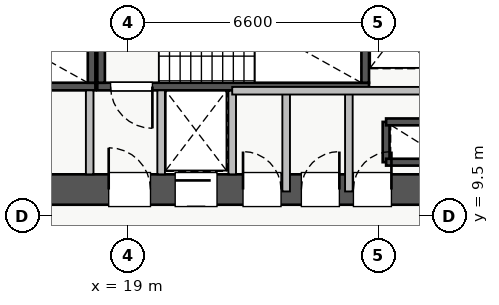
"""IFC4 building model, lengths in metres.
Left out: names, types, materials, properties, quantities, classifications, styles, units other than length and angle.
Written with IfcOpenShell. Run it as: python <this file> out.ifc"""

import sys

from ifc_helpers import new_model, si_unit, direction, frame, frame_2d, origin, place, context, subcontext, project, spatial, rectangle, extrude, source, transform, mapped, element, fill, save


model = new_model("IFC4")
c1 = context("Model", 3, precision=1e-05, world=origin(), true_north=direction((0.0, 1.0)))
c2 = subcontext(c1, "Body", "Model", "MODEL_VIEW")
j1 = project(units=[si_unit("LENGTHUNIT", "METRE"), si_unit("PLANEANGLEUNIT", "RADIAN")], contexts=[c1])
p1 = place(None, origin())
s1 = spatial("IfcSite", under=j1, at=p1, CompositionType="ELEMENT")
p2 = place(p1, origin())
s2 = spatial("IfcBuilding", under=s1, at=p2, CompositionType="ELEMENT")
p3 = place(p2, frame((0.0, 0.0, 53.5)))
s3 = spatial("IfcBuildingStorey", under=s2, at=p3, CompositionType="ELEMENT", Elevation=53.5)
p4 = place(p3, frame((25.8, 10.92, 0.0), z_axis=(0.0, 0.0, 1.0), x_axis=(0.0, 1.0, 0.0)))
e1 = element("IfcWall", 1, at=p4, inside=s3, PredefinedType="SHEAR", context=c2, shape_type="SweptSolid", body=[
    extrude(rectangle(XDim=1.06, YDim=0.18, at=frame_2d((0.53, 0.0))), origin(), (0.0, 0.0, 1.0), 3.07),
])
for number, where, z_axis, x_axis in (
    (2, (25.8, 11.98, 0.0), (0.0, 0.0, 1.0), (1.0, 0.0, 0.0)),
    (3, (25.8, 10.92, 0.0), (0.0, 0.0, 1.0), (1.0, 0.0, 0.0)),
):
    element("IfcWall", number, at=place(p3, frame(where, z_axis=z_axis, x_axis=x_axis)), inside=s3, PredefinedType="SHEAR", context=c2, shape_type="SweptSolid", body=[
        extrude(rectangle(XDim=1.2, YDim=0.18, at=frame_2d((0.6, 0.0))), origin(), (0.0, 0.0, 1.0), 3.07),
    ])
p5 = place(p3, frame((19.88, 12.8, 0.0), z_axis=(0.0, 0.0, 1.0), x_axis=(1.0, 0.0, 0.0)))
e4 = element("IfcWall", 4, at=p5, inside=s3, PredefinedType="SHEAR", context=c2, shape_type="SweptSolid", body=[
    extrude(rectangle(XDim=1.87, YDim=0.18, at=frame_2d((0.935, 0.0))), origin(), (0.0, 0.0, 1.0), 3.07),
])
p6 = place(p3, frame((11.0, 12.91, 0.0), z_axis=(0.0, 0.0, 1.0), x_axis=(1.0, 0.0, 0.0)))
e5 = element("IfcWall", 5, at=p6, inside=s3, PredefinedType="SHEAR", context=c2, shape_type="SweptSolid", body=[
    extrude(rectangle(XDim=7.15, YDim=0.2, at=frame_2d((3.575, 0.0))), origin(), (0.0, 0.0, 1.0), 3.25),
])
p7 = place(p6, frame((0.35, 0.0, 0.0)))
e6 = element("IfcOpeningElement", 6, at=p7, cuts=e5, PredefinedType="OPENING", context=c2, shape_type="SweptSolid", body=[
    extrude(rectangle(XDim=1.1, YDim=2.05, at=frame_2d((0.55, 1.025))), frame((0.0, 0.11, 0.0), z_axis=(0.0, -1.0, 0.0), x_axis=(1.0, 0.0, 0.0)), (0.0, 0.0, 1.0), 0.22),
])
p8 = place(p3, frame((18.05, 13.01, 0.0), z_axis=(0.0, 0.0, 1.0), x_axis=(0.0, 1.0, 0.0)))
e7 = element("IfcWall", 7, at=p8, inside=s3, PredefinedType="SHEAR", context=c2, shape_type="SweptSolid", body=[
    extrude(rectangle(XDim=2.94, YDim=0.2, at=frame_2d((1.47, 0.0))), origin(), (0.0, 0.0, 1.0), 3.25),
])
p9 = place(p3, frame((18.2, 12.91, 0.0), z_axis=(0.0, 0.0, 1.0), x_axis=(1.0, 0.0, 0.0)))
e8 = element("IfcWall", 8, at=p9, inside=s3, PredefinedType="SHEAR", context=c2, shape_type="SweptSolid", body=[
    extrude(rectangle(XDim=7.15, YDim=0.2, at=frame_2d((3.575, 0.0))), origin(), (0.0, 0.0, 1.0), 3.25),
])
p10 = place(p9, frame((0.35, 0.0, 0.0)))
e9 = element("IfcOpeningElement", 9, at=p10, cuts=e8, PredefinedType="OPENING", context=c2, shape_type="SweptSolid", body=[
    extrude(rectangle(XDim=1.1, YDim=2.05, at=frame_2d((0.55, 1.025))), frame((0.0, 0.11, 0.0), z_axis=(0.0, -1.0, 0.0), x_axis=(1.0, 0.0, 0.0)), (0.0, 0.0, 1.0), 0.22),
])
for number, where, z_axis, x_axis in (
    (10, (18.3, 13.01, 0.0), (0.0, 0.0, 1.0), (0.0, 1.0, 0.0)),
    (11, (25.25, 13.01, 0.0), (0.0, 0.0, 1.0), (0.0, 1.0, 0.0)),
):
    element("IfcWall", number, at=place(p3, frame(where, z_axis=z_axis, x_axis=x_axis)), inside=s3, PredefinedType="SHEAR", context=c2, shape_type="SweptSolid", body=[
        extrude(rectangle(XDim=2.94, YDim=0.2, at=frame_2d((1.47, 0.0))), origin(), (0.0, 0.0, 1.0), 3.25),
    ])
p11 = place(p3, frame((10.2, 10.2, 0.0), z_axis=(0.0, 0.0, 1.0), x_axis=(1.0, 0.0, 0.0)))
e12 = element("IfcWall", 12, at=p11, inside=s3, PredefinedType="SHEAR", context=c2, shape_type="SweptSolid", body=[
    extrude(rectangle(XDim=17.6, YDim=0.8, at=frame_2d((8.8, 0.0))), origin(), (0.0, 0.0, 1.0), 3.25),
])
p12 = place(p11, frame((1.15, 0.0, 0.0)))
e13 = element("IfcOpeningElement", 13, at=p12, cuts=e12, PredefinedType="OPENING", context=c2, shape_type="SweptSolid", body=[
    extrude(rectangle(XDim=1.1, YDim=2.05, at=frame_2d((0.55, 1.025))), frame((0.0, 0.41, 0.0), z_axis=(0.0, -1.0, 0.0), x_axis=(1.0, 0.0, 0.0)), (0.0, 0.0, 1.0), 0.82),
])
p13 = place(p11, frame((8.3, 0.0, 0.0)))
e14 = element("IfcOpeningElement", 14, at=p13, cuts=e12, PredefinedType="OPENING", context=c2, shape_type="SweptSolid", body=[
    extrude(rectangle(XDim=1.1, YDim=2.05, at=frame_2d((0.55, 1.025))), frame((0.0, 0.41, 0.0), z_axis=(0.0, -1.0, 0.0), x_axis=(1.0, 0.0, 0.0)), (0.0, 0.0, 1.0), 0.82),
])
p14 = place(p11, frame((10.05, 0.0, 0.0)))
e15 = element("IfcOpeningElement", 15, at=p14, cuts=e12, PredefinedType="OPENING", context=c2, shape_type="SweptSolid", body=[
    extrude(rectangle(XDim=1.1, YDim=2.05, at=frame_2d((0.55, 1.025))), frame((0.0, 0.41, 0.0), z_axis=(0.0, -1.0, 0.0), x_axis=(1.0, 0.0, 0.0)), (0.0, 0.0, 1.0), 0.82),
])
p15 = place(p11, frame((14.74, 0.0, 0.0)))
e16 = element("IfcOpeningElement", 16, at=p15, cuts=e12, PredefinedType="OPENING", context=c2, shape_type="SweptSolid", body=[
    extrude(rectangle(XDim=1.0, YDim=2.05, at=frame_2d((0.5, 1.025))), frame((0.0, 0.41, 0.0), z_axis=(0.0, -1.0, 0.0), x_axis=(1.0, 0.0, 0.0)), (0.0, 0.0, 1.0), 0.82),
])
p16 = place(p11, frame((11.835, 0.0, 0.0)))
e17 = element("IfcOpeningElement", 17, at=p16, cuts=e12, PredefinedType="OPENING", context=c2, shape_type="SweptSolid", body=[
    extrude(rectangle(XDim=1.0, YDim=2.05, at=frame_2d((0.5, 1.025))), frame((0.0, 0.41, 0.0), z_axis=(0.0, -1.0, 0.0), x_axis=(1.0, 0.0, 0.0)), (0.0, 0.0, 1.0), 0.82),
])
p17 = place(p11, frame((13.37, 0.0, 0.0)))
e18 = element("IfcOpeningElement", 18, at=p17, cuts=e12, PredefinedType="OPENING", context=c2, shape_type="SweptSolid", body=[
    extrude(rectangle(XDim=1.0, YDim=2.05, at=frame_2d((0.5, 1.025))), frame((0.0, 0.41, 0.0), z_axis=(0.0, -1.0, 0.0), x_axis=(1.0, 0.0, 0.0)), (0.0, 0.0, 1.0), 0.82),
])
for number, where, z_axis, x_axis in (
    (19, (18.0, 10.6, 0.0), (0.0, 0.0, 1.0), (0.0, 1.0, 0.0)),
    (20, (19.88, 10.6, 0.0), (0.0, 0.0, 1.0), (0.0, 1.0, 0.0)),
):
    element("IfcWall", number, at=place(p3, frame(where, z_axis=z_axis, x_axis=x_axis)), inside=s3, PredefinedType="PARTITIONING", context=c2, shape_type="SweptSolid", body=[
        extrude(rectangle(XDim=2.21, YDim=0.2, at=frame_2d((1.105, 0.0))), origin(), (0.0, 0.0, 1.0), 3.07),
    ])
p18 = place(p3, frame((24.82, 10.15, 0.0), z_axis=(0.0, 0.0, 1.0), x_axis=(0.0, 1.0, 0.0)))
e21 = element("IfcWall", 21, at=p18, inside=s3, PredefinedType="PARTITIONING", context=c2, shape_type="SweptSolid", body=[
    extrude(rectangle(XDim=2.65, YDim=0.2, at=frame_2d((1.325, 0.0))), origin(), (0.0, 0.0, 1.0), 3.07),
])
p19 = place(p3, frame((21.75, 10.6, 0.0), z_axis=(0.0, 0.0, 1.0), x_axis=(0.0, 1.0, 0.0)))
e22 = element("IfcWall", 22, at=p19, inside=s3, PredefinedType="PARTITIONING", context=c2, shape_type="SweptSolid", body=[
    extrude(rectangle(XDim=2.2, YDim=0.2, at=frame_2d((1.1, 0.0))), origin(), (0.0, 0.0, 1.0), 3.07),
])
p20 = place(p3, frame((23.17, 10.15, 0.0), z_axis=(0.0, 0.0, 1.0), x_axis=(0.0, 1.0, 0.0)))
e23 = element("IfcWall", 23, at=p20, inside=s3, PredefinedType="PARTITIONING", context=c2, shape_type="SweptSolid", body=[
    extrude(rectangle(XDim=2.65, YDim=0.2, at=frame_2d((1.325, 0.0))), origin(), (0.0, 0.0, 1.0), 3.07),
])
p21 = place(p3, frame((21.75, 12.8, 0.0), z_axis=(0.0, 0.0, 1.0), x_axis=(1.0, 0.0, 0.0)))
e24 = element("IfcWall", 24, at=p21, inside=s3, PredefinedType="PARTITIONING", context=c2, shape_type="SweptSolid", body=[
    extrude(rectangle(XDim=5.17, YDim=0.2, at=frame_2d((2.585, 0.0))), origin(), (0.0, 0.0, 1.0), 3.07),
])
m1 = source(origin(), c2, "Body", "SweptSolid", [
    extrude(rectangle(XDim=1.1, YDim=2.05, at=frame_2d((0.55, 1.025))), frame((0.0, 0.025, 0.0), z_axis=(0.0, -1.0, 0.0), x_axis=(1.0, 0.0, 0.0)), (0.0, 0.0, 1.0), 0.05),
])
p22 = place(p13, origin())
e25 = element("IfcDoor", 25, at=p22, inside=s3, OperationType="SINGLE_SWING_LEFT", PredefinedType="DOOR", context=c2, shape_type="MappedRepresentation", body=[
    mapped(m1, transform((0.0, 0.0, 0.0), x_axis=(1.0, 0.0, 0.0), y_axis=(0.0, 1.0, 0.0), z_axis=(0.0, 0.0, 1.0), scale=1.0)),
])
fill(e14, e25)
p23 = place(p10, frame((1.1, 0.0, 0.0), z_axis=(0.0, 0.0, 1.0), x_axis=(-1.0, 0.0, 0.0)))
e26 = element("IfcDoor", 26, at=p23, inside=s3, OperationType="SINGLE_SWING_RIGHT", PredefinedType="DOOR", context=c2, shape_type="MappedRepresentation", body=[
    mapped(m1, transform((0.0, 0.0, 0.0), x_axis=(1.0, 0.0, 0.0), y_axis=(0.0, 1.0, 0.0), z_axis=(0.0, 0.0, 1.0), scale=1.0)),
])
fill(e9, e26)
p24 = place(p14, origin())
e27 = element("IfcDoor", 27, at=p24, inside=s3, OperationType="SLIDING_TO_RIGHT", PredefinedType="DOOR", context=c2, shape_type="MappedRepresentation", body=[
    mapped(m1, transform((0.0, 0.0, 0.0), x_axis=(1.0, 0.0, 0.0), y_axis=(0.0, 1.0, 0.0), z_axis=(0.0, 0.0, 1.0), scale=1.0)),
])
fill(e15, e27)
m2 = source(origin(), c2, "Body", "SweptSolid", [
    extrude(rectangle(XDim=1.0, YDim=2.05, at=frame_2d((0.5, 1.025))), frame((0.0, 0.025, 0.0), z_axis=(0.0, -1.0, 0.0), x_axis=(1.0, 0.0, 0.0)), (0.0, 0.0, 1.0), 0.05),
])
p25 = place(p15, origin())
e28 = element("IfcDoor", 28, at=p25, inside=s3, OperationType="SINGLE_SWING_RIGHT", PredefinedType="DOOR", context=c2, shape_type="MappedRepresentation", body=[
    mapped(m2, transform((0.0, 0.0, 0.0), x_axis=(1.0, 0.0, 0.0), y_axis=(0.0, 1.0, 0.0), z_axis=(0.0, 0.0, 1.0), scale=1.0)),
])
fill(e16, e28)
p26 = place(p16, origin())
e29 = element("IfcDoor", 29, at=p26, inside=s3, OperationType="SINGLE_SWING_LEFT", PredefinedType="DOOR", context=c2, shape_type="MappedRepresentation", body=[
    mapped(m2, transform((0.0, 0.0, 0.0), x_axis=(1.0, 0.0, 0.0), y_axis=(0.0, 1.0, 0.0), z_axis=(0.0, 0.0, 1.0), scale=1.0)),
])
fill(e17, e29)
p27 = place(p17, origin())
e30 = element("IfcDoor", 30, at=p27, inside=s3, OperationType="SINGLE_SWING_RIGHT", PredefinedType="DOOR", context=c2, shape_type="MappedRepresentation", body=[
    mapped(m2, transform((0.0, 0.0, 0.0), x_axis=(1.0, 0.0, 0.0), y_axis=(0.0, 1.0, 0.0), z_axis=(0.0, 0.0, 1.0), scale=1.0)),
])
fill(e18, e30)
save(model, sys.argv[1])
